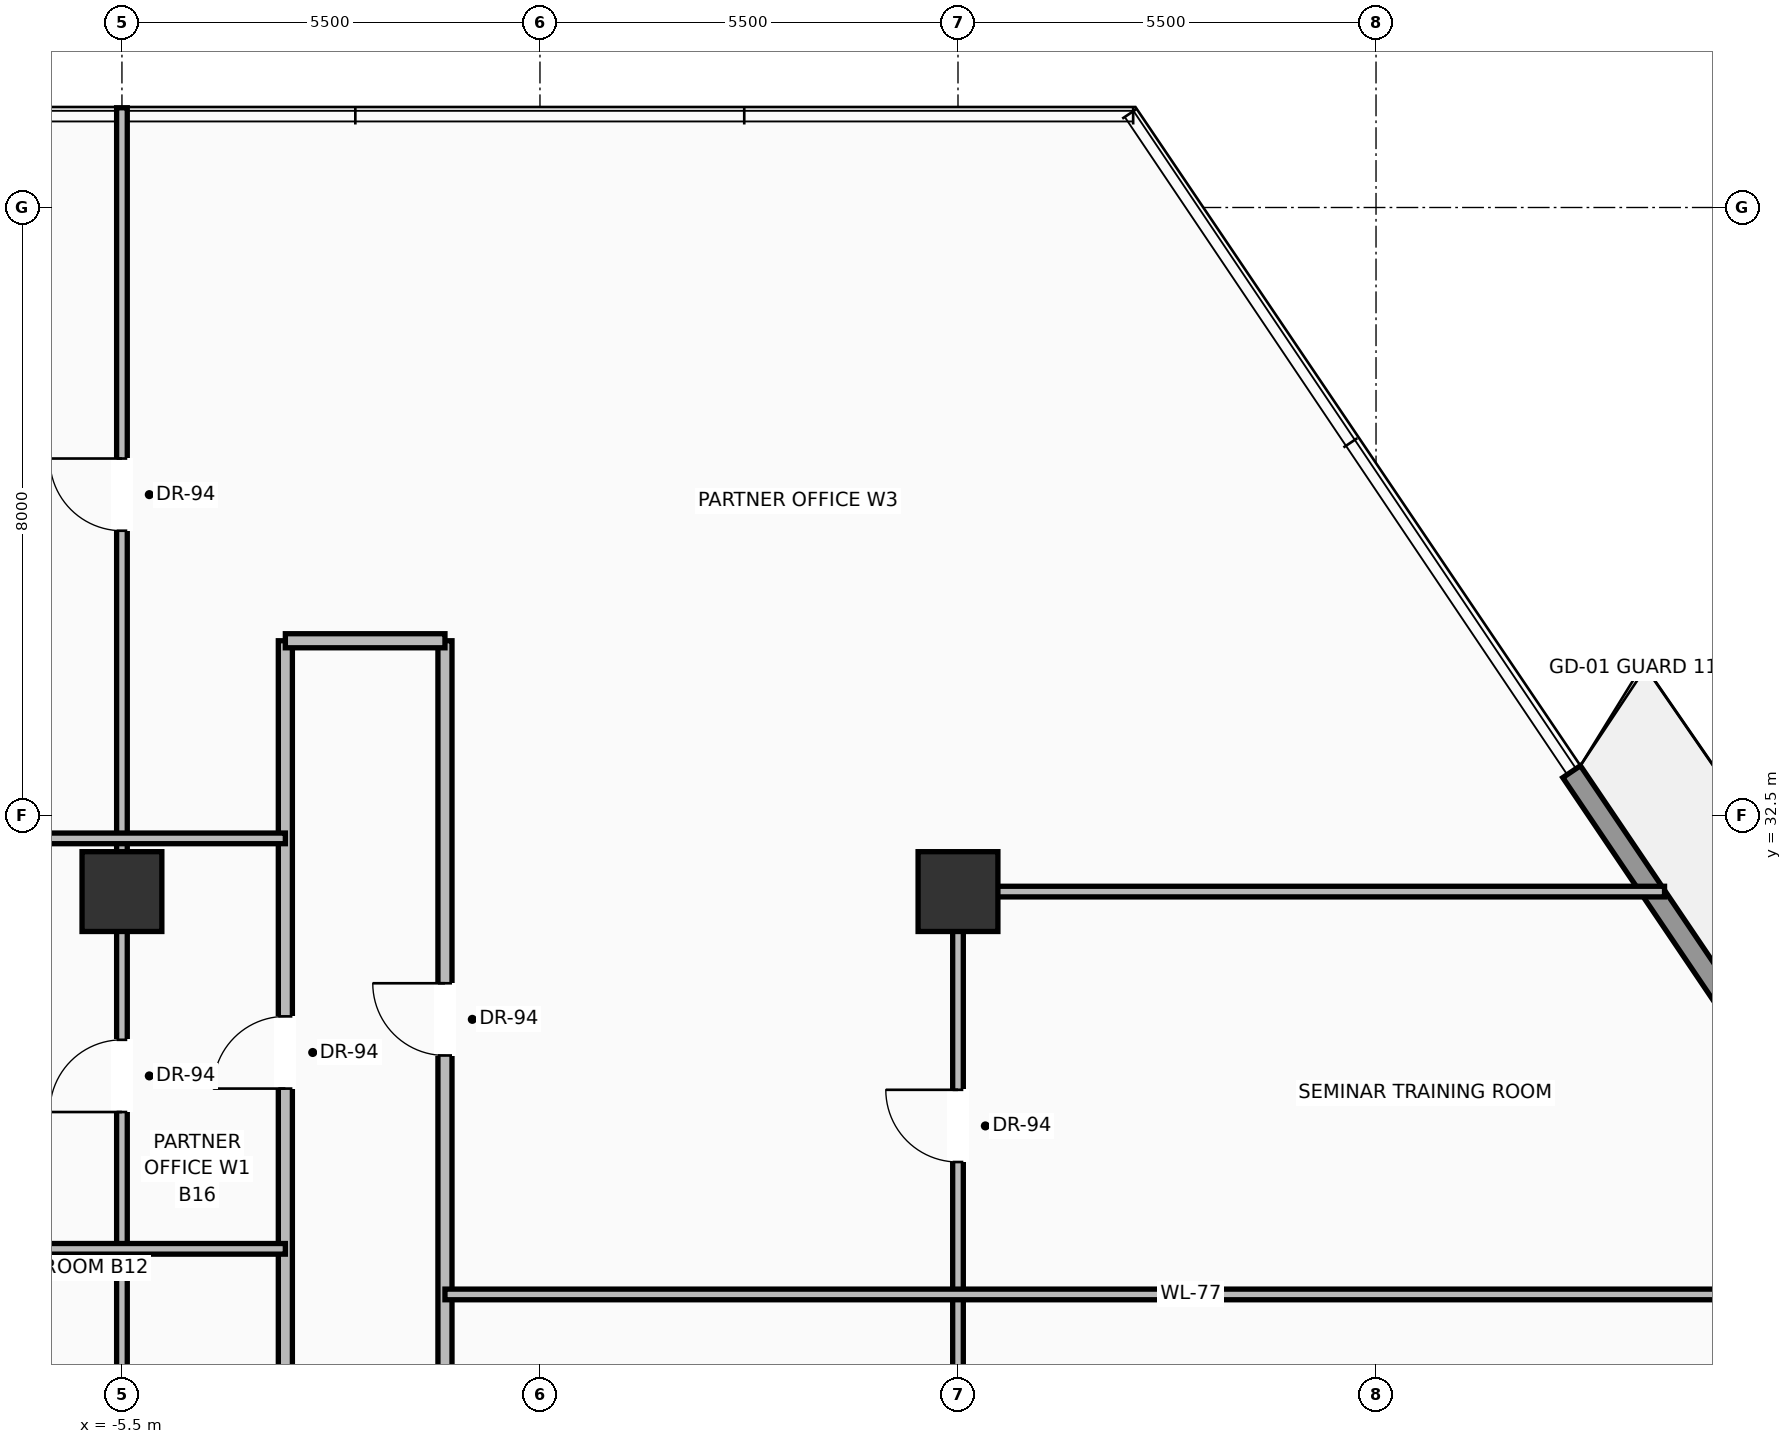
"""IFC4 building model, lengths in metres.
Left out: names, types, materials, properties, quantities, classifications, styles, units other than length and angle.
Written with IfcOpenShell. Run it as: python <this file> out.ifc"""

import sys

from ifc_helpers import new_model, si_unit, direction, frame, frame_2d, origin, origin_2d, place, context, subcontext, project, spatial, rectangle, extrude, source, transform, mapped, element, fill, save


model = new_model("IFC4")
c1 = context("Model", 3, precision=1e-05, world=origin(), true_north=direction((0.0, 1.0)))
c2 = subcontext(c1, "Body", "Model", "MODEL_VIEW")
j1 = project(units=[si_unit("LENGTHUNIT", "METRE"), si_unit("PLANEANGLEUNIT", "RADIAN")], contexts=[c1])
p1 = place(None, origin())
s1 = spatial("IfcSite", under=j1, at=p1, CompositionType="ELEMENT")
p2 = place(p1, origin())
s2 = spatial("IfcBuilding", under=s1, at=p2, CompositionType="ELEMENT")
p3 = place(p2, frame((0.0, 0.0, 38.6)))
s3 = spatial("IfcBuildingStorey", under=s2, at=p3, CompositionType="ELEMENT", Elevation=38.6)
m1 = source(origin(), c2, "Body", "SweptSolid", [
    extrude(rectangle(XDim=1.05, YDim=1.05, at=origin_2d()), origin(), (0.0, 0.0, 1.0), 3.7),
])
for number, where, z_axis, x_axis in (
    (1, (-5.5, 31.5, 0.0), (0.0, 0.0, 1.0), (1.0, 0.0, 0.0)),
    (2, (5.5, 31.5, 0.0), (0.0, 0.0, 1.0), (1.0, 0.0, 0.0)),
):
    element("IfcColumn", number, at=place(p3, frame(where, z_axis=z_axis, x_axis=x_axis)), inside=s3, PredefinedType="COLUMN", context=c2, shape_type="MappedRepresentation", body=[
        mapped(m1, transform((0.0, 0.0, 0.0), scale=1.0)),
    ])
p4 = place(p3, frame((13.573, 33.078, 0.0), z_axis=(0.0, 0.0, 1.0), x_axis=(0.559811376514, -0.828620071399, 0.0)))
e3 = element("IfcWall", 3, at=p4, inside=s3, PredefinedType="SOLIDWALL", context=c2, shape_type="SweptSolid", body=[
    extrude(rectangle(XDim=16.435, YDim=0.28, at=frame_2d((8.217, 0.0))), origin(), (0.0, 0.0, 1.0), 3.03),
])
p5 = place(p4, frame((3.944, 0.0, 0.0)))
e4 = element("IfcOpeningElement", 4, at=p5, cuts=e3, PredefinedType="OPENING", context=c2, shape_type="SweptSolid", body=[
    extrude(rectangle(XDim=1.6, YDim=2.35, at=frame_2d((0.8, 1.175))), frame((0.0, 0.15, 0.0), z_axis=(0.0, -1.0, 0.0), x_axis=(1.0, 0.0, 0.0)), (0.0, 0.0, 1.0), 0.3),
])
p6 = place(p4, frame((11.175, 0.0, 0.9)))
e5 = element("IfcOpeningElement", 5, at=p6, cuts=e3, PredefinedType="OPENING", context=c2, shape_type="SweptSolid", body=[
    extrude(rectangle(XDim=2.0, YDim=1.85, at=frame_2d((1.0, 0.925))), frame((0.0, 0.15, 0.0), z_axis=(0.0, -1.0, 0.0), x_axis=(1.0, 0.0, 0.0)), (0.0, 0.0, 1.0), 0.3),
])
p7 = place(p3, frame((-3.35, 18.65, 0.0), z_axis=(0.0, 0.0, 1.0), x_axis=(0.0, 1.0, 0.0)))
e6 = element("IfcWall", 6, at=p7, inside=s3, PredefinedType="PARTITIONING", context=c2, shape_type="SweptSolid", body=[
    extrude(rectangle(XDim=16.15, YDim=0.185, at=frame_2d((8.075, 0.0))), origin(), (0.0, 0.0, 1.0), 2.747),
])
p8 = place(p7, frame((4.506, 0.0, 0.0)))
e7 = element("IfcOpeningElement", 7, at=p8, cuts=e6, PredefinedType="OPENING", context=c2, shape_type="SweptSolid", body=[
    extrude(rectangle(XDim=0.95, YDim=2.2, at=frame_2d((0.475, 1.1))), frame((0.0, 0.103, 0.0), z_axis=(0.0, -1.0, 0.0), x_axis=(1.0, 0.0, 0.0)), (0.0, 0.0, 1.0), 0.205),
])
p9 = place(p7, frame((10.258, 0.0, 0.0)))
e8 = element("IfcOpeningElement", 8, at=p9, cuts=e6, PredefinedType="OPENING", context=c2, shape_type="SweptSolid", body=[
    extrude(rectangle(XDim=0.95, YDim=2.2, at=frame_2d((0.475, 1.1))), frame((0.0, 0.103, 0.0), z_axis=(0.0, -1.0, 0.0), x_axis=(1.0, 0.0, 0.0)), (0.0, 0.0, 1.0), 0.205),
])
p10 = place(p3, frame((-1.25, 18.65, 0.0), z_axis=(0.0, 0.0, 1.0), x_axis=(0.0, 1.0, 0.0)))
e9 = element("IfcWall", 9, at=p10, inside=s3, PredefinedType="PARTITIONING", context=c2, shape_type="SweptSolid", body=[
    extrude(rectangle(XDim=16.15, YDim=0.185, at=frame_2d((8.075, 0.0))), origin(), (0.0, 0.0, 1.0), 2.747),
])
p11 = place(p10, frame((10.694, 0.0, 0.0)))
e10 = element("IfcOpeningElement", 10, at=p11, cuts=e9, PredefinedType="OPENING", context=c2, shape_type="SweptSolid", body=[
    extrude(rectangle(XDim=0.95, YDim=2.2, at=frame_2d((0.475, 1.1))), frame((0.0, 0.103, 0.0), z_axis=(0.0, -1.0, 0.0), x_axis=(1.0, 0.0, 0.0)), (0.0, 0.0, 1.0), 0.205),
])
p12 = place(p3, frame((-3.35, 34.8, 0.0), z_axis=(0.0, 0.0, 1.0), x_axis=(1.0, 0.0, 0.0)))
e11 = element("IfcWall", 11, at=p12, inside=s3, PredefinedType="PARTITIONING", context=c2, shape_type="SweptSolid", body=[
    extrude(rectangle(XDim=2.1, YDim=0.185, at=frame_2d((1.05, 0.0))), origin(), (0.0, 0.0, 1.0), 2.979),
])
p13 = place(p3, frame((-5.5, 24.5, 0.0), z_axis=(0.0, 0.0, 1.0), x_axis=(0.0, 1.0, 0.0)))
e12 = element("IfcWall", 12, at=p13, inside=s3, PredefinedType="PARTITIONING", context=c2, shape_type="SweptSolid", body=[
    extrude(rectangle(XDim=17.312, YDim=0.14, at=frame_2d((8.656, 0.0))), origin(), (0.0, 0.0, 1.0), 2.747),
])
p14 = place(p13, frame((11.747, 0.0, 0.0)))
e13 = element("IfcOpeningElement", 13, at=p14, cuts=e12, PredefinedType="OPENING", context=c2, shape_type="SweptSolid", body=[
    extrude(rectangle(XDim=0.95, YDim=2.2, at=frame_2d((0.475, 1.1))), frame((0.0, 0.08, 0.0), z_axis=(0.0, -1.0, 0.0), x_axis=(1.0, 0.0, 0.0)), (0.0, 0.0, 1.0), 0.16),
])
p15 = place(p13, frame((4.1, 0.0, 0.0)))
e14 = element("IfcOpeningElement", 14, at=p15, cuts=e12, PredefinedType="OPENING", context=c2, shape_type="SweptSolid", body=[
    extrude(rectangle(XDim=0.95, YDim=2.2, at=frame_2d((0.475, 1.1))), frame((0.0, 0.08, 0.0), z_axis=(0.0, -1.0, 0.0), x_axis=(1.0, 0.0, 0.0)), (0.0, 0.0, 1.0), 0.16),
])
p16 = place(p3, frame((5.5, 18.3, 0.0), z_axis=(0.0, 0.0, 1.0), x_axis=(0.0, 1.0, 0.0)))
e15 = element("IfcWall", 15, at=p16, inside=s3, PredefinedType="PARTITIONING", context=c2, shape_type="SweptSolid", body=[
    extrude(rectangle(XDim=13.2, YDim=0.14, at=frame_2d((6.6, 0.0))), origin(), (0.0, 0.0, 1.0), 2.747),
])
p17 = place(p16, frame((9.642, 0.0, 0.0)))
e16 = element("IfcOpeningElement", 16, at=p17, cuts=e15, PredefinedType="OPENING", context=c2, shape_type="SweptSolid", body=[
    extrude(rectangle(XDim=0.95, YDim=2.2, at=frame_2d((0.475, 1.1))), frame((0.0, 0.08, 0.0), z_axis=(0.0, -1.0, 0.0), x_axis=(1.0, 0.0, 0.0)), (0.0, 0.0, 1.0), 0.16),
])
p18 = place(p3, frame((5.5, 31.5, 0.0), z_axis=(0.0, 0.0, 1.0), x_axis=(1.0, 0.0, 0.0)))
e17 = element("IfcWall", 17, at=p18, inside=s3, PredefinedType="PARTITIONING", context=c2, shape_type="SweptSolid", body=[
    extrude(rectangle(XDim=9.296, YDim=0.14, at=frame_2d((4.648, 0.0))), origin(), (0.0, 0.0, 1.0), 2.747),
])
p19 = place(p3, frame((-17.806, 26.8, 0.0), z_axis=(0.0, 0.0, 1.0), x_axis=(1.0, 0.0, 0.0)))
e18 = element("IfcWall", 18, at=p19, inside=s3, PredefinedType="PARTITIONING", context=c2, shape_type="SweptSolid", body=[
    extrude(rectangle(XDim=14.456, YDim=0.14, at=frame_2d((7.228, 0.0))), origin(), (0.0, 0.0, 1.0), 2.747),
])
p20 = place(p19, frame((3.008, 0.0, 0.0)))
e19 = element("IfcOpeningElement", 19, at=p20, cuts=e18, PredefinedType="OPENING", context=c2, shape_type="SweptSolid", body=[
    extrude(rectangle(XDim=0.95, YDim=2.2, at=frame_2d((0.475, 1.1))), frame((0.0, 0.08, 0.0), z_axis=(0.0, -1.0, 0.0), x_axis=(1.0, 0.0, 0.0)), (0.0, 0.0, 1.0), 0.16),
])
p21 = place(p3, frame((-14.124, 32.2, 0.0), z_axis=(0.0, 0.0, 1.0), x_axis=(1.0, 0.0, 0.0)))
e20 = element("IfcWall", 20, at=p21, inside=s3, PredefinedType="PARTITIONING", context=c2, shape_type="SweptSolid", body=[
    extrude(rectangle(XDim=10.774, YDim=0.14, at=frame_2d((5.387, 0.0))), origin(), (0.0, 0.0, 1.0), 2.747),
])
p22 = place(p3, frame((-1.25, 26.2, 0.0), z_axis=(0.0, 0.0, 1.0), x_axis=(1.0, 0.0, 0.0)))
e21 = element("IfcWall", 21, at=p22, inside=s3, PredefinedType="PARTITIONING", context=c2, shape_type="SweptSolid", body=[
    extrude(rectangle(XDim=19.627, YDim=0.14, at=frame_2d((9.813, 0.0))), origin(), (0.0, 0.0, 1.0), 2.747),
])
m2 = source(origin(), c2, "Body", "SweptSolid", [
    extrude(rectangle(XDim=0.95, YDim=2.2, at=frame_2d((0.475, 1.1))), frame((0.0, 0.025, 0.0), z_axis=(0.0, -1.0, 0.0), x_axis=(1.0, 0.0, 0.0)), (0.0, 0.0, 1.0), 0.05),
])
p23 = place(p11, origin())
e22 = element("IfcDoor", 22, at=p23, inside=s3, OperationType="SINGLE_SWING_RIGHT", PredefinedType="DOOR", context=c2, shape_type="MappedRepresentation", body=[
    mapped(m2, transform((0.0, 0.0, 0.0), scale=1.0)),
])
fill(e10, e22)
p24 = place(p17, origin())
e23 = element("IfcDoor", 23, at=p24, inside=s3, OperationType="SINGLE_SWING_RIGHT", PredefinedType="DOOR", context=c2, shape_type="MappedRepresentation", body=[
    mapped(m2, transform((0.0, 0.0, 0.0), scale=1.0)),
])
fill(e16, e23)
p25 = place(p9, origin())
e24 = element("IfcDoor", 24, at=p25, inside=s3, OperationType="SINGLE_SWING_LEFT", PredefinedType="DOOR", context=c2, shape_type="MappedRepresentation", body=[
    mapped(m2, transform((0.0, 0.0, 0.0), scale=1.0)),
])
fill(e8, e24)
p26 = place(p14, origin())
e25 = element("IfcDoor", 25, at=p26, inside=s3, OperationType="SINGLE_SWING_RIGHT", PredefinedType="DOOR", context=c2, shape_type="MappedRepresentation", body=[
    mapped(m2, transform((0.0, 0.0, 0.0), scale=1.0)),
])
fill(e13, e25)
p27 = place(p15, origin())
e26 = element("IfcDoor", 26, at=p27, inside=s3, OperationType="SINGLE_SWING_LEFT", PredefinedType="DOOR", context=c2, shape_type="MappedRepresentation", body=[
    mapped(m2, transform((0.0, 0.0, 0.0), scale=1.0)),
])
fill(e14, e26)
save(model, sys.argv[1])
